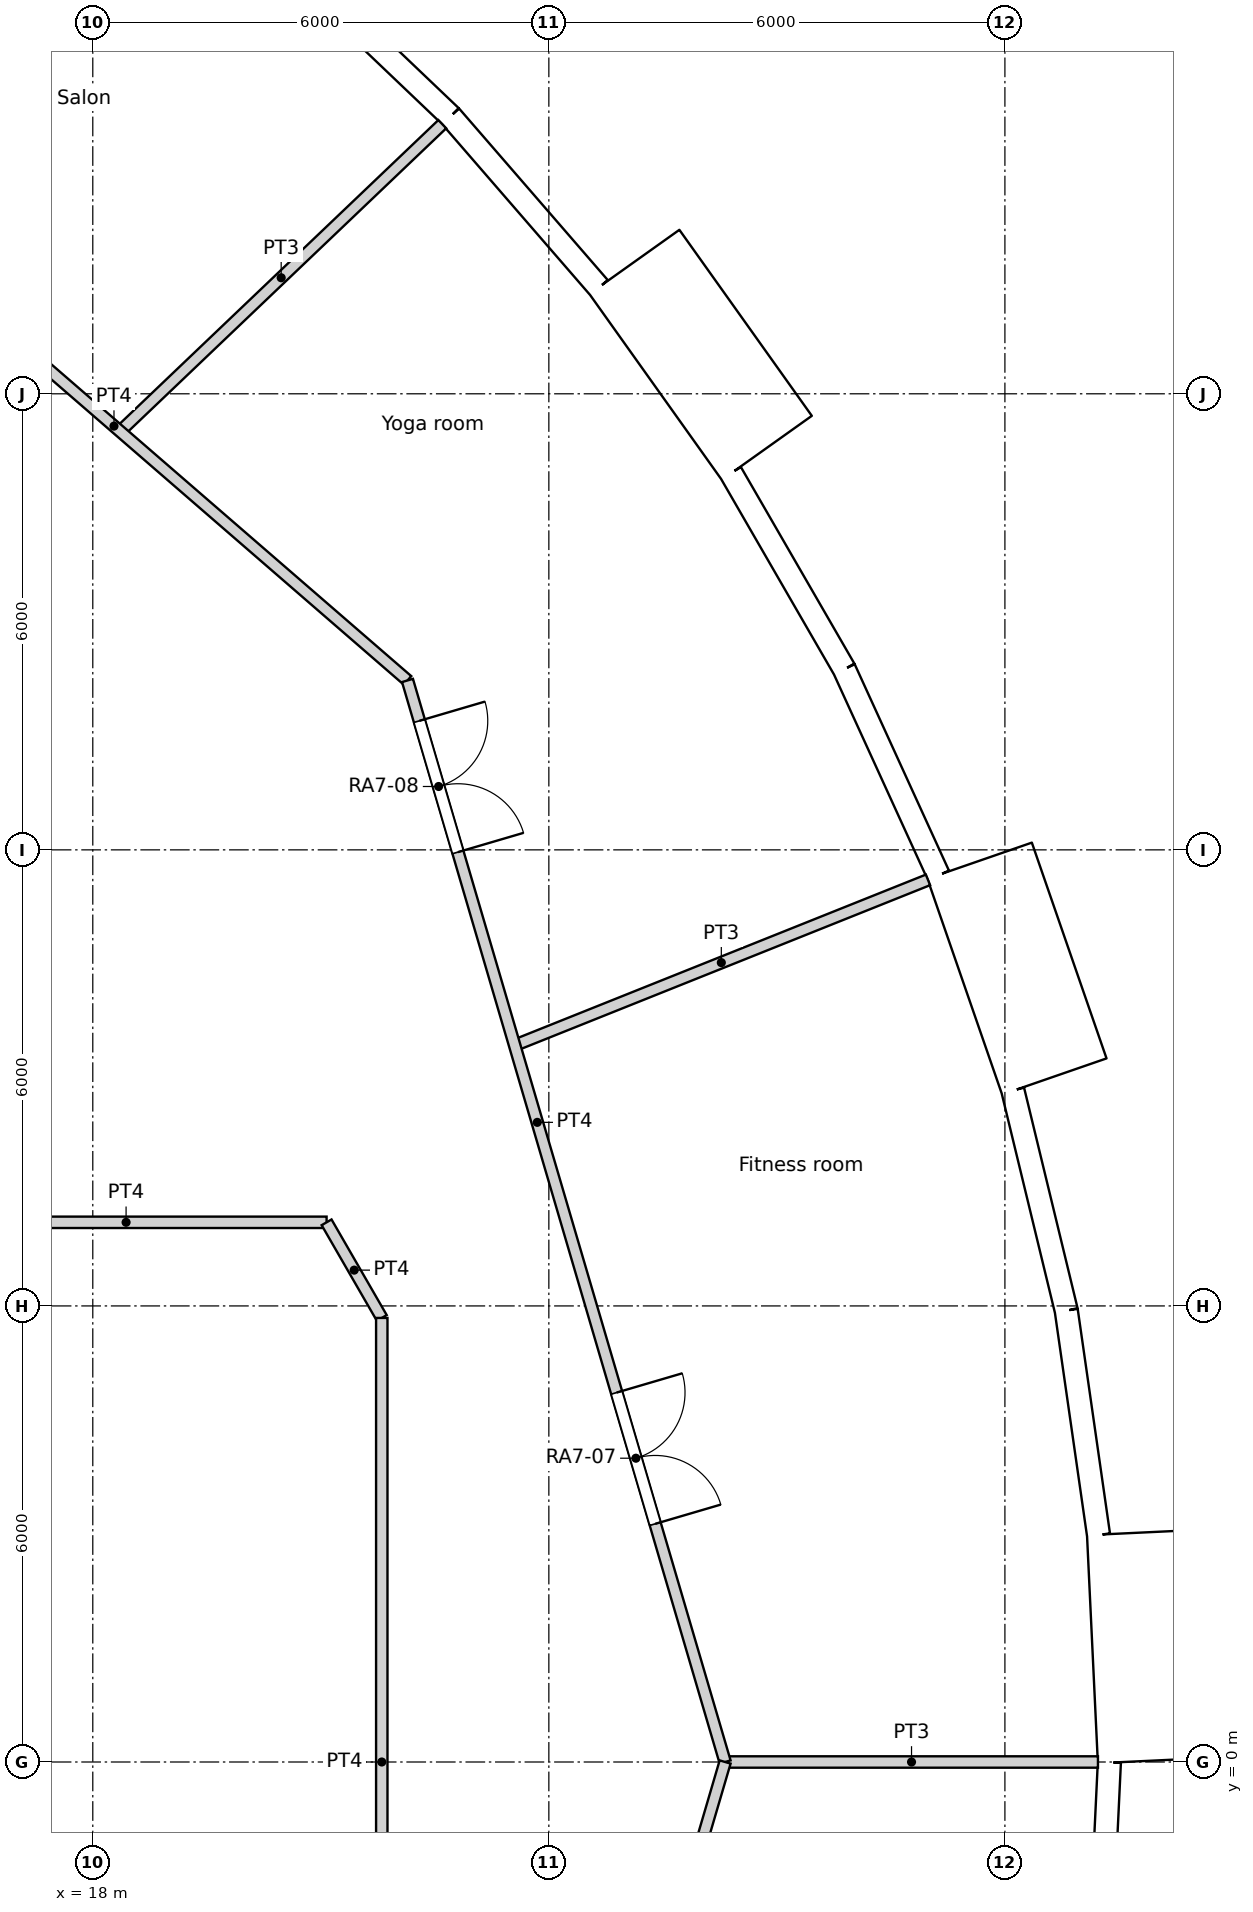
"""IFC4 building model, lengths in metres.
Left out: names, types, materials, properties, quantities, classifications, styles, units other than length and angle.
Written with IfcOpenShell. Run it as: python <this file> out.ifc"""

import sys

from ifc_helpers import new_model, si_unit, direction, frame, frame_2d, origin, origin_2d, place, context, subcontext, project, spatial, rectangle, circle, extrude, element, fill, save


model = new_model("IFC4")
c1 = context("Model", 3, precision=1e-05, world=origin(), true_north=direction((0.0, 1.0)))
c2 = subcontext(c1, "Body", "Model", "MODEL_VIEW")
j1 = project(units=[si_unit("LENGTHUNIT", "METRE"), si_unit("PLANEANGLEUNIT", "RADIAN")], contexts=[c1])
p1 = place(None, origin())
s1 = spatial("IfcSite", under=j1, at=p1, CompositionType="ELEMENT")
p2 = place(p1, origin())
s2 = spatial("IfcBuilding", under=s1, at=p2, CompositionType="ELEMENT")
p3 = place(p2, frame((0.0, 0.0, 93.0)))
s3 = spatial("IfcBuildingStorey", under=s2, at=p3, CompositionType="ELEMENT", Elevation=93.0)
for number, where, z_axis, x_axis in (
    (1, (30.275, 0.0, 0.0), (0.0, 0.0, 1.0), (1.0, 0.0, 0.0)),
    (2, (29.728, 5.729, 0.0), (0.0, 0.0, 1.0), (1.0, 0.0, 0.0)),
    (3, (28.106, 11.252, 0.0), (0.0, 0.0, 1.0), (1.0, 0.0, 0.0)),
    (4, (25.469, 16.368, 0.0), (0.0, 0.0, 1.0), (1.0, 0.0, 0.0)),
    (5, (21.911, 20.892, 0.0), (0.0, 0.0, 1.0), (1.0, 0.0, 0.0)),
):
    element("IfcColumn", number, at=place(p3, frame(where, z_axis=z_axis, x_axis=x_axis)), inside=s3, PredefinedType="COLUMN", context=c2, shape_type="SweptSolid", body=[
        extrude(circle(Radius=0.6, at=origin_2d()), origin(), (0.0, 0.0, 1.0), 3.6),
    ])
for number, where, z_axis, x_axis in (
    (6, (24.548, 0.0, 0.0), (0.0, 0.0, 1.0), (1.0, 0.0, 0.0)),
    (7, (23.886, 5.661, 0.0), (0.0, 0.0, 1.0), (1.0, 0.0, 0.0)),
    (8, (21.937, 11.017, 0.0), (0.0, 0.0, 1.0), (1.0, 0.0, 0.0)),
    (9, (18.805, 15.779, 0.0), (0.0, 0.0, 1.0), (1.0, 0.0, 0.0)),
):
    element("IfcColumn", number, at=place(p3, frame(where, z_axis=z_axis, x_axis=x_axis)), inside=s3, PredefinedType="COLUMN", context=c2, shape_type="SweptSolid", body=[
        extrude(circle(Radius=0.65, at=origin_2d()), origin(), (0.0, 0.0, 1.0), 3.6),
    ])
for number, where, z_axis, x_axis in (
    (10, (18.822, 0.0, 0.0), (0.0, 0.0, 1.0), (1.0, 0.0, 0.0)),
    (11, (17.986, 5.548, 0.0), (0.0, 0.0, 1.0), (1.0, 0.0, 0.0)),
):
    element("IfcColumn", number, at=place(p3, frame(where, z_axis=z_axis, x_axis=x_axis)), inside=s3, PredefinedType="COLUMN", context=c2, shape_type="SweptSolid", body=[
        extrude(circle(Radius=0.7, at=origin_2d()), origin(), (0.0, 0.0, 1.0), 3.6),
    ])
p4 = place(p3, frame((31.949, 0.02, -0.45), z_axis=(0.0, 0.0, 1.0), x_axis=(-0.047607680889, 0.998866111509, 0.0)))
e12 = element("IfcWall", 12, at=p4, inside=s3, PredefinedType="ELEMENTEDWALL", context=c2, shape_type="SweptSolid", body=[
    extrude(rectangle(XDim=3.0, YDim=1.45, at=frame_2d((1.5, 0.0))), origin(), (0.0, 0.0, 1.0), 3.6),
])
p5 = place(p4, frame((1.5, 0.0, 2.0)))
e13 = element("IfcOpeningElement", 13, at=p5, cuts=e12, PredefinedType="OPENING", context=c2, shape_type="SweptSolid", body=[
    extrude(circle(Radius=0.9, at=origin_2d()), frame((0.0, 0.735, 0.0), z_axis=(0.0, -1.0, 0.0), x_axis=(1.0, 0.0, 0.0)), (0.0, 0.0, 1.0), 1.47),
])
p6 = place(p3, frame((31.231, 2.988, 0.0), z_axis=(0.0, 0.0, 1.0), x_axis=(-0.142315996627, 0.989821275334, 0.0)))
e14 = element("IfcWall", 14, at=p6, inside=s3, PredefinedType="SOLIDWALL", context=c2, shape_type="SweptSolid", body=[
    extrude(rectangle(XDim=2.98, YDim=0.3, at=frame_2d((1.49, 0.0))), origin(), (0.0, 0.0, 1.0), 3.15),
])
p7 = place(p6, frame((1.49, 0.0, 1.55)))
e15 = element("IfcOpeningElement", 15, at=p7, cuts=e14, PredefinedType="OPENING", context=c2, shape_type="SweptSolid", body=[
    extrude(circle(Radius=0.9, at=origin_2d()), frame((0.0, 0.16, 0.0), z_axis=(0.0, -1.0, 0.0), x_axis=(1.0, 0.0, 0.0)), (0.0, 0.0, 1.0), 0.32),
])
p8 = place(p3, frame((30.807, 5.938, 0.0), z_axis=(0.0, 0.0, 1.0), x_axis=(-0.235743081534, 0.971815414319, 0.0)))
e16 = element("IfcWall", 16, at=p8, inside=s3, PredefinedType="SOLIDWALL", context=c2, shape_type="SweptSolid", body=[
    extrude(rectangle(XDim=2.979, YDim=0.3, at=frame_2d((1.49, 0.0))), origin(), (0.0, 0.0, 1.0), 3.15),
])
p9 = place(p8, frame((1.49, 0.0, 1.55)))
e17 = element("IfcOpeningElement", 17, at=p9, cuts=e16, PredefinedType="OPENING", context=c2, shape_type="SweptSolid", body=[
    extrude(circle(Radius=0.9, at=origin_2d()), frame((0.0, 0.16, 0.0), z_axis=(0.0, -1.0, 0.0), x_axis=(1.0, 0.0, 0.0)), (0.0, 0.0, 1.0), 0.32),
])
p10 = place(p3, frame((30.649, 9.021, -0.45), z_axis=(0.0, 0.0, 1.0), x_axis=(-0.327071431777, 0.944999618262, 0.0)))
e18 = element("IfcWall", 18, at=p10, inside=s3, PredefinedType="ELEMENTEDWALL", context=c2, shape_type="SweptSolid", body=[
    extrude(rectangle(XDim=3.0, YDim=1.45, at=frame_2d((1.5, 0.0))), origin(), (0.0, 0.0, 1.0), 3.6),
])
p11 = place(p10, frame((1.5, 0.0, 2.0)))
e19 = element("IfcOpeningElement", 19, at=p11, cuts=e18, PredefinedType="OPENING", context=c2, shape_type="SweptSolid", body=[
    extrude(circle(Radius=0.9, at=origin_2d()), frame((0.0, 0.735, 0.0), z_axis=(0.0, -1.0, 0.0), x_axis=(1.0, 0.0, 0.0)), (0.0, 0.0, 1.0), 1.47),
])
p12 = place(p3, frame((29.125, 11.666, 0.0), z_axis=(0.0, 0.0, 1.0), x_axis=(-0.415407317162, 0.909635509888, 0.0)))
e20 = element("IfcWall", 20, at=p12, inside=s3, PredefinedType="SOLIDWALL", context=c2, shape_type="SweptSolid", body=[
    extrude(rectangle(XDim=2.98, YDim=0.3, at=frame_2d((1.49, 0.0))), origin(), (0.0, 0.0, 1.0), 3.15),
])
p13 = place(p12, frame((1.49, 0.0, 1.55)))
e21 = element("IfcOpeningElement", 21, at=p13, cuts=e20, PredefinedType="OPENING", context=c2, shape_type="SweptSolid", body=[
    extrude(circle(Radius=0.9, at=origin_2d()), frame((0.0, 0.16, 0.0), z_axis=(0.0, -1.0, 0.0), x_axis=(1.0, 0.0, 0.0)), (0.0, 0.0, 1.0), 0.32),
])
p14 = place(p3, frame((27.887, 14.377, 0.0), z_axis=(0.0, 0.0, 1.0), x_axis=(-0.499999078476, 0.866025935826, 0.0)))
e22 = element("IfcWall", 22, at=p14, inside=s3, PredefinedType="SOLIDWALL", context=c2, shape_type="SweptSolid", body=[
    extrude(rectangle(XDim=2.979, YDim=0.3, at=frame_2d((1.49, 0.0))), origin(), (0.0, 0.0, 1.0), 3.15),
])
p15 = place(p14, frame((1.49, 0.0, 1.55)))
e23 = element("IfcOpeningElement", 23, at=p15, cuts=e22, PredefinedType="OPENING", context=c2, shape_type="SweptSolid", body=[
    extrude(circle(Radius=0.9, at=origin_2d()), frame((0.0, 0.16, 0.0), z_axis=(0.0, -1.0, 0.0), x_axis=(1.0, 0.0, 0.0)), (0.0, 0.0, 1.0), 0.32),
])
p16 = place(p3, frame((26.866, 17.29, -0.45), z_axis=(0.0, 0.0, 1.0), x_axis=(-0.580090570606, 0.814551981088, 0.0)))
e24 = element("IfcWall", 24, at=p16, inside=s3, PredefinedType="ELEMENTEDWALL", context=c2, shape_type="SweptSolid", body=[
    extrude(rectangle(XDim=3.0, YDim=1.45, at=frame_2d((1.5, 0.0))), origin(), (0.0, 0.0, 1.0), 3.6),
])
p17 = place(p16, frame((1.5, 0.0, 2.0)))
e25 = element("IfcOpeningElement", 25, at=p17, cuts=e24, PredefinedType="OPENING", context=c2, shape_type="SweptSolid", body=[
    extrude(circle(Radius=0.9, at=origin_2d()), frame((0.0, 0.735, 0.0), z_axis=(0.0, -1.0, 0.0), x_axis=(1.0, 0.0, 0.0)), (0.0, 0.0, 1.0), 1.47),
])
p18 = place(p3, frame((24.658, 19.399, 0.0), z_axis=(0.0, 0.0, 1.0), x_axis=(-0.654830712471, 0.755775587066, 0.0)))
e26 = element("IfcWall", 26, at=p18, inside=s3, PredefinedType="SOLIDWALL", context=c2, shape_type="SweptSolid", body=[
    extrude(rectangle(XDim=2.98, YDim=0.3, at=frame_2d((1.49, 0.0))), origin(), (0.0, 0.0, 1.0), 3.15),
])
p19 = place(p18, frame((1.49, 0.0, 1.55)))
e27 = element("IfcOpeningElement", 27, at=p19, cuts=e26, PredefinedType="OPENING", context=c2, shape_type="SweptSolid", body=[
    extrude(circle(Radius=0.9, at=origin_2d()), frame((0.0, 0.16, 0.0), z_axis=(0.0, -1.0, 0.0), x_axis=(1.0, 0.0, 0.0)), (0.0, 0.0, 1.0), 0.32),
])
p20 = place(p3, frame((22.707, 21.651, 0.0), z_axis=(0.0, 0.0, 1.0), x_axis=(-0.723744206617, 0.690068346896, 0.0)))
e28 = element("IfcWall", 28, at=p20, inside=s3, PredefinedType="SOLIDWALL", context=c2, shape_type="SweptSolid", body=[
    extrude(rectangle(XDim=2.98, YDim=0.3, at=frame_2d((1.49, 0.0))), origin(), (0.0, 0.0, 1.0), 3.15),
])
p21 = place(p20, frame((1.49, 0.0, 1.55)))
e29 = element("IfcOpeningElement", 29, at=p21, cuts=e28, PredefinedType="OPENING", context=c2, shape_type="SweptSolid", body=[
    extrude(circle(Radius=0.9, at=origin_2d()), frame((0.0, 0.16, 0.0), z_axis=(0.0, -1.0, 0.0), x_axis=(1.0, 0.0, 0.0)), (0.0, 0.0, 1.0), 0.32),
])
p22 = place(p3, frame((31.232, -2.982, 0.0), z_axis=(0.0, 0.0, 1.0), x_axis=(0.047522328113, 0.998870175914, 0.0)))
e30 = element("IfcWall", 30, at=p22, inside=s3, PredefinedType="SOLIDWALL", context=c2, shape_type="SweptSolid", body=[
    extrude(rectangle(XDim=2.98, YDim=0.3, at=frame_2d((1.49, 0.0))), origin(), (0.0, 0.0, 1.0), 3.15),
])
p23 = place(p22, frame((1.49, 0.0, 1.55)))
e31 = element("IfcOpeningElement", 31, at=p23, cuts=e30, PredefinedType="OPENING", context=c2, shape_type="SweptSolid", body=[
    extrude(circle(Radius=0.9, at=origin_2d()), frame((0.0, 0.16, 0.0), z_axis=(0.0, -1.0, 0.0), x_axis=(1.0, 0.0, 0.0)), (0.0, 0.0, 1.0), 0.32),
])
p24 = place(p3, frame((21.802, -5.842, 0.0), z_axis=(0.0, 0.0, 1.0), x_axis=(0.0, 1.0, 0.0)))
e32 = element("IfcWall", 32, at=p24, inside=s3, PredefinedType="PARTITIONING", context=c2, shape_type="SweptSolid", body=[
    extrude(rectangle(XDim=11.684, YDim=0.15, at=frame_2d((5.842, 0.0))), origin(), (0.0, 0.0, 1.0), 3.15),
])
p25 = place(p3, frame((21.076, 7.1, 0.0), z_axis=(0.0, 0.0, 1.0), x_axis=(0.499863102386, -0.866104427234, 0.0)))
e33 = element("IfcWall", 33, at=p25, inside=s3, PredefinedType="PARTITIONING", context=c2, shape_type="SweptSolid", body=[
    extrude(rectangle(XDim=1.453, YDim=0.15, at=frame_2d((0.726, 0.0))), origin(), (0.0, 0.0, 1.0), 3.15),
])
p26 = place(p3, frame((15.8, 7.1, 0.0), z_axis=(0.0, 0.0, 1.0), x_axis=(1.0, 0.0, 0.0)))
e34 = element("IfcWall", 34, at=p26, inside=s3, PredefinedType="PARTITIONING", context=c2, shape_type="SweptSolid", body=[
    extrude(rectangle(XDim=5.276, YDim=0.15, at=frame_2d((2.638, 0.0))), origin(), (0.0, 0.0, 1.0), 3.15),
])
p27 = place(p3, frame((22.14, 14.229, 0.0), z_axis=(0.0, 0.0, 1.0), x_axis=(0.281780364869, -0.959478934617, 0.0)))
e35 = element("IfcWall", 35, at=p27, inside=s3, PredefinedType="PARTITIONING", context=c2, shape_type="SweptSolid", body=[
    extrude(rectangle(XDim=14.83, YDim=0.15, at=frame_2d((7.415, 0.0))), origin(), (0.0, 0.0, 1.0), 3.15),
])
p28 = place(p27, frame((9.764, 0.0, 0.0)))
e36 = element("IfcOpeningElement", 36, at=p28, cuts=e35, PredefinedType="OPENING", context=c2, shape_type="SweptSolid", body=[
    extrude(rectangle(XDim=1.8, YDim=2.1, at=frame_2d((0.9, 1.05))), frame((0.0, 0.075, 0.0), z_axis=(0.0, -1.0, 0.0), x_axis=(1.0, 0.0, 0.0)), (0.0, 0.0, 1.0), 0.15),
])
p29 = place(p27, frame((0.554, 0.0, 0.0)))
e37 = element("IfcOpeningElement", 37, at=p29, cuts=e35, PredefinedType="OPENING", context=c2, shape_type="SweptSolid", body=[
    extrude(rectangle(XDim=1.8, YDim=2.1, at=frame_2d((0.9, 1.05))), frame((0.0, 0.075, 0.0), z_axis=(0.0, -1.0, 0.0), x_axis=(1.0, 0.0, 0.0)), (0.0, 0.0, 1.0), 0.15),
])
p30 = place(p3, frame((10.932, 23.939, 0.0), z_axis=(0.0, 0.0, 1.0), x_axis=(0.755823777664, -0.654775088956, 0.0)))
e38 = element("IfcWall", 38, at=p30, inside=s3, PredefinedType="PARTITIONING", context=c2, shape_type="SweptSolid", body=[
    extrude(rectangle(XDim=14.83, YDim=0.15, at=frame_2d((7.415, 0.0))), origin(), (0.0, 0.0, 1.0), 3.15),
])
p31 = place(p30, frame((3.56, 0.0, 0.0)))
e39 = element("IfcOpeningElement", 39, at=p31, cuts=e38, PredefinedType="OPENING", context=c2, shape_type="SweptSolid", body=[
    extrude(rectangle(XDim=1.0, YDim=2.04, at=frame_2d((0.5, 1.02))), frame((0.0, 0.075, 0.0), z_axis=(0.0, -1.0, 0.0), x_axis=(1.0, 0.0, 0.0)), (0.0, 0.0, 1.0), 0.15),
])
p32 = place(p3, frame((22.141, -14.229, 0.0), z_axis=(0.0, 0.0, 1.0), x_axis=(0.281730446162, 0.959493593363, 0.0)))
e40 = element("IfcWall", 40, at=p32, inside=s3, PredefinedType="PARTITIONING", context=c2, shape_type="SweptSolid", body=[
    extrude(rectangle(XDim=14.83, YDim=0.15, at=frame_2d((7.415, 0.0))), origin(), (0.0, 0.0, 1.0), 3.15),
])
p33 = place(p32, frame((5.865, 0.0, 0.0)))
e41 = element("IfcOpeningElement", 41, at=p33, cuts=e40, PredefinedType="OPENING", context=c2, shape_type="SweptSolid", body=[
    extrude(rectangle(XDim=1.8, YDim=2.1, at=frame_2d((0.9, 1.05))), frame((0.0, 0.075, 0.0), z_axis=(0.0, -1.0, 0.0), x_axis=(1.0, 0.0, 0.0)), (0.0, 0.0, 1.0), 0.15),
])
p34 = place(p3, frame((23.55, 9.428, 0.0), z_axis=(0.0, 0.0, 1.0), x_axis=(0.9283702981, 0.371656547911, 0.0)))
e42 = element("IfcWall", 42, at=p34, inside=s3, PredefinedType="PARTITIONING", context=c2, shape_type="SweptSolid", body=[
    extrude(rectangle(XDim=5.858, YDim=0.15, at=frame_2d((2.929, 0.0))), origin(), (0.0, 0.0, 1.0), 3.15),
])
p35 = place(p3, frame((26.319, 0.0, 0.0), z_axis=(0.0, 0.0, 1.0), x_axis=(1.0, 0.0, 0.0)))
e43 = element("IfcWall", 43, at=p35, inside=s3, PredefinedType="PARTITIONING", context=c2, shape_type="SweptSolid", body=[
    extrude(rectangle(XDim=4.905, YDim=0.15, at=frame_2d((2.453, 0.0))), origin(), (0.0, 0.0, 1.0), 3.15),
])
p36 = place(p3, frame((18.359, 17.506, 0.0), z_axis=(0.0, 0.0, 1.0), x_axis=(0.723808715798, 0.690000683286, 0.0)))
e44 = element("IfcWall", 44, at=p36, inside=s3, PredefinedType="PARTITIONING", context=c2, shape_type="SweptSolid", body=[
    extrude(rectangle(XDim=5.856, YDim=0.15, at=frame_2d((2.928, 0.0))), origin(), (0.0, 0.0, 1.0), 3.15),
])
p37 = place(p5, origin())
e45 = element("IfcWindow", 45, at=p37, inside=s3, PartitioningType="SINGLE_PANEL", PredefinedType="WINDOW", context=c2, shape_type="SweptSolid", body=[
    extrude(circle(Radius=0.9, at=origin_2d()), frame((0.0, 0.695, 0.0), z_axis=(0.0, -1.0, 0.0), x_axis=(1.0, 0.0, 0.0)), (0.0, 0.0, 1.0), 0.1),
])
fill(e13, e45)
p38 = place(p7, origin())
e46 = element("IfcWindow", 46, at=p38, inside=s3, PartitioningType="SINGLE_PANEL", PredefinedType="WINDOW", context=c2, shape_type="SweptSolid", body=[
    extrude(circle(Radius=0.9, at=origin_2d()), frame((0.0, 0.12, 0.0), z_axis=(0.0, -1.0, 0.0), x_axis=(1.0, 0.0, 0.0)), (0.0, 0.0, 1.0), 0.1),
])
fill(e15, e46)
p39 = place(p9, origin())
e47 = element("IfcWindow", 47, at=p39, inside=s3, PartitioningType="SINGLE_PANEL", PredefinedType="WINDOW", context=c2, shape_type="SweptSolid", body=[
    extrude(circle(Radius=0.9, at=origin_2d()), frame((0.0, 0.12, 0.0), z_axis=(0.0, -1.0, 0.0), x_axis=(1.0, 0.0, 0.0)), (0.0, 0.0, 1.0), 0.1),
])
fill(e17, e47)
p40 = place(p11, origin())
e48 = element("IfcWindow", 48, at=p40, inside=s3, PartitioningType="SINGLE_PANEL", PredefinedType="WINDOW", context=c2, shape_type="SweptSolid", body=[
    extrude(circle(Radius=0.9, at=origin_2d()), frame((0.0, 0.695, 0.0), z_axis=(0.0, -1.0, 0.0), x_axis=(1.0, 0.0, 0.0)), (0.0, 0.0, 1.0), 0.1),
])
fill(e19, e48)
p41 = place(p13, origin())
e49 = element("IfcWindow", 49, at=p41, inside=s3, PartitioningType="SINGLE_PANEL", PredefinedType="WINDOW", context=c2, shape_type="SweptSolid", body=[
    extrude(circle(Radius=0.9, at=origin_2d()), frame((0.0, 0.12, 0.0), z_axis=(0.0, -1.0, 0.0), x_axis=(1.0, 0.0, 0.0)), (0.0, 0.0, 1.0), 0.1),
])
fill(e21, e49)
p42 = place(p15, origin())
e50 = element("IfcWindow", 50, at=p42, inside=s3, PartitioningType="SINGLE_PANEL", PredefinedType="WINDOW", context=c2, shape_type="SweptSolid", body=[
    extrude(circle(Radius=0.9, at=origin_2d()), frame((0.0, 0.12, 0.0), z_axis=(0.0, -1.0, 0.0), x_axis=(1.0, 0.0, 0.0)), (0.0, 0.0, 1.0), 0.1),
])
fill(e23, e50)
p43 = place(p17, origin())
e51 = element("IfcWindow", 51, at=p43, inside=s3, PartitioningType="SINGLE_PANEL", PredefinedType="WINDOW", context=c2, shape_type="SweptSolid", body=[
    extrude(circle(Radius=0.9, at=origin_2d()), frame((0.0, 0.695, 0.0), z_axis=(0.0, -1.0, 0.0), x_axis=(1.0, 0.0, 0.0)), (0.0, 0.0, 1.0), 0.1),
])
fill(e25, e51)
p44 = place(p19, origin())
e52 = element("IfcWindow", 52, at=p44, inside=s3, PartitioningType="SINGLE_PANEL", PredefinedType="WINDOW", context=c2, shape_type="SweptSolid", body=[
    extrude(circle(Radius=0.9, at=origin_2d()), frame((0.0, 0.12, 0.0), z_axis=(0.0, -1.0, 0.0), x_axis=(1.0, 0.0, 0.0)), (0.0, 0.0, 1.0), 0.1),
])
fill(e27, e52)
p45 = place(p21, origin())
e53 = element("IfcWindow", 53, at=p45, inside=s3, PartitioningType="SINGLE_PANEL", PredefinedType="WINDOW", context=c2, shape_type="SweptSolid", body=[
    extrude(circle(Radius=0.9, at=origin_2d()), frame((0.0, 0.12, 0.0), z_axis=(0.0, -1.0, 0.0), x_axis=(1.0, 0.0, 0.0)), (0.0, 0.0, 1.0), 0.1),
])
fill(e29, e53)
p46 = place(p23, origin())
e54 = element("IfcWindow", 54, at=p46, inside=s3, PartitioningType="SINGLE_PANEL", PredefinedType="WINDOW", context=c2, shape_type="SweptSolid", body=[
    extrude(circle(Radius=0.9, at=origin_2d()), frame((0.0, 0.12, 0.0), z_axis=(0.0, -1.0, 0.0), x_axis=(1.0, 0.0, 0.0)), (0.0, 0.0, 1.0), 0.1),
])
fill(e31, e54)
p47 = place(p28, origin())
e55 = element("IfcDoor", 55, at=p47, inside=s3, OperationType="DOUBLE_DOOR_SINGLE_SWING", PredefinedType="DOOR", context=c2, shape_type="SweptSolid", body=[
    extrude(rectangle(XDim=1.8, YDim=2.1, at=frame_2d((0.9, 1.05))), frame((0.0, 0.025, 0.0), z_axis=(0.0, -1.0, 0.0), x_axis=(1.0, 0.0, 0.0)), (0.0, 0.0, 1.0), 0.05),
])
fill(e36, e55)
p48 = place(p29, origin())
e56 = element("IfcDoor", 56, at=p48, inside=s3, OperationType="DOUBLE_DOOR_SINGLE_SWING", PredefinedType="DOOR", context=c2, shape_type="SweptSolid", body=[
    extrude(rectangle(XDim=1.8, YDim=2.1, at=frame_2d((0.9, 1.05))), frame((0.0, 0.025, 0.0), z_axis=(0.0, -1.0, 0.0), x_axis=(1.0, 0.0, 0.0)), (0.0, 0.0, 1.0), 0.05),
])
fill(e37, e56)
save(model, sys.argv[1])
